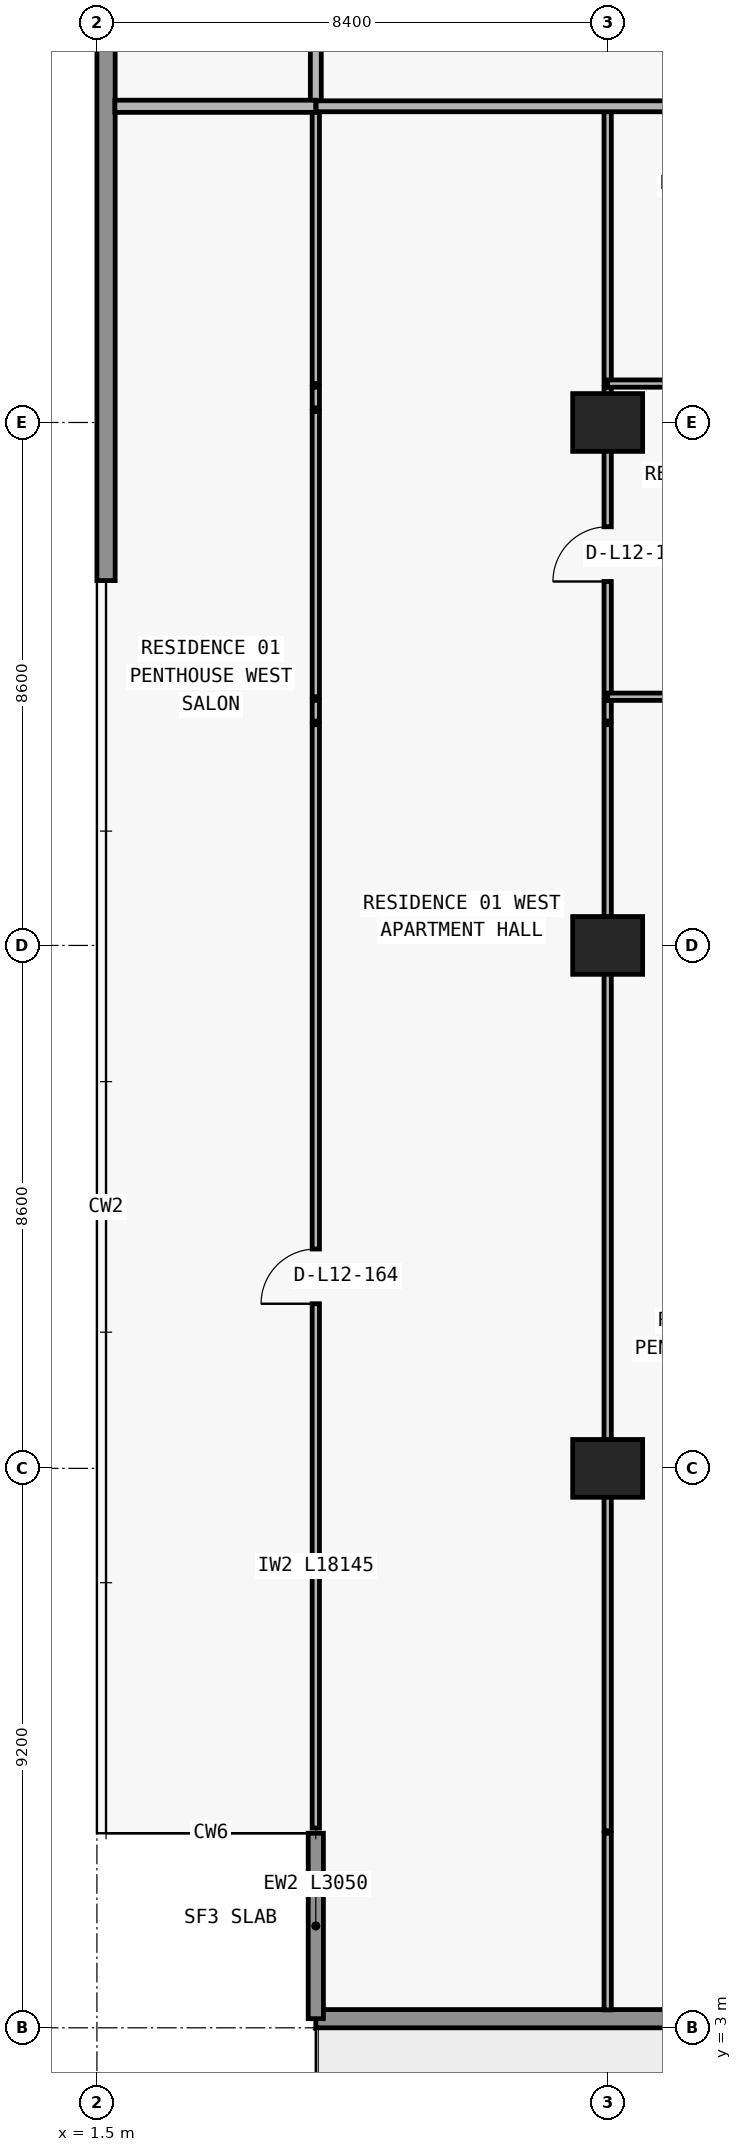
"""IFC4 building model, lengths in metres.
Left out: names, types, materials, properties, quantities, classifications, styles, units other than length and angle.
Written with IfcOpenShell. Run it as: python <this file> out.ifc"""

import sys

from ifc_helpers import new_model, si_unit, direction, frame, frame_2d, origin, origin_2d, place, context, subcontext, project, spatial, rectangle, extrude, element, fill, save


model = new_model("IFC4")
c1 = context("Model", 3, precision=1e-05, world=origin(), true_north=direction((0.0, 1.0)))
c2 = subcontext(c1, "Body", "Model", "MODEL_VIEW")
j1 = project(units=[si_unit("LENGTHUNIT", "METRE"), si_unit("PLANEANGLEUNIT", "RADIAN")], contexts=[c1])
p1 = place(None, origin())
s1 = spatial("IfcSite", under=j1, at=p1, CompositionType="ELEMENT")
p2 = place(p1, origin())
s2 = spatial("IfcBuilding", under=s1, at=p2, CompositionType="ELEMENT")
p3 = place(p2, frame((0.0, 0.0, 49.8)))
s3 = spatial("IfcBuildingStorey", under=s2, at=p3, CompositionType="ELEMENT", Elevation=49.8)
for number, where, z_axis, x_axis in (
    (1, (9.9, 12.2, 0.0), (0.0, 0.0, 1.0), (1.0, 0.0, 0.0)),
    (2, (9.9, 20.8, 0.0), (0.0, 0.0, 1.0), (1.0, 0.0, 0.0)),
    (3, (9.9, 29.4, 0.0), (0.0, 0.0, 1.0), (1.0, 0.0, 0.0)),
):
    element("IfcColumn", number, at=place(p3, frame(where, z_axis=z_axis, x_axis=x_axis)), inside=s3, PredefinedType="COLUMN", context=c2, shape_type="SweptSolid", body=[
        extrude(rectangle(XDim=1.15, YDim=0.95, at=origin_2d()), origin(), (0.0, 0.0, 1.0), 3.05),
    ])
p4 = place(p3, frame((72.7, 3.15, 0.0), z_axis=(0.0, 0.0, 1.0), x_axis=(-1.0, 0.0, 0.0)))
e4 = element("IfcWall", 4, at=p4, inside=s3, PredefinedType="STANDARD", context=c2, shape_type="SweptSolid", body=[
    extrude(rectangle(XDim=67.6, YDim=0.3, at=frame_2d((33.8, 0.0))), origin(), (0.0, 0.0, 1.0), 3.05),
])
p5 = place(p4, frame((59.826, 0.0, 0.0)))
e5 = element("IfcOpeningElement", 5, at=p5, cuts=e4, PredefinedType="OPENING", context=c2, shape_type="SweptSolid", body=[
    extrude(rectangle(XDim=2.0, YDim=2.3, at=frame_2d((1.0, 1.15))), frame((0.0, 0.16, 0.0), z_axis=(0.0, -1.0, 0.0), x_axis=(1.0, 0.0, 0.0)), (0.0, 0.0, 1.0), 0.32),
])
p6 = place(p4, frame((55.526, 0.0, 0.85)))
e6 = element("IfcOpeningElement", 6, at=p6, cuts=e4, PredefinedType="OPENING", context=c2, shape_type="SweptSolid", body=[
    extrude(rectangle(XDim=2.2, YDim=1.55, at=frame_2d((1.1, 0.775))), frame((0.0, 0.16, 0.0), z_axis=(0.0, -1.0, 0.0), x_axis=(1.0, 0.0, 0.0)), (0.0, 0.0, 1.0), 0.32),
])
p7 = place(p4, frame((51.09, 0.0, 0.0)))
e7 = element("IfcOpeningElement", 7, at=p7, cuts=e4, PredefinedType="OPENING", context=c2, shape_type="SweptSolid", body=[
    extrude(rectangle(XDim=2.0, YDim=2.3, at=frame_2d((1.0, 1.15))), frame((0.0, 0.16, 0.0), z_axis=(0.0, -1.0, 0.0), x_axis=(1.0, 0.0, 0.0)), (0.0, 0.0, 1.0), 0.32),
])
p8 = place(p4, frame((46.99, 0.0, 0.85)))
e8 = element("IfcOpeningElement", 8, at=p8, cuts=e4, PredefinedType="OPENING", context=c2, shape_type="SweptSolid", body=[
    extrude(rectangle(XDim=1.8, YDim=1.55, at=frame_2d((0.9, 0.775))), frame((0.0, 0.16, 0.0), z_axis=(0.0, -1.0, 0.0), x_axis=(1.0, 0.0, 0.0)), (0.0, 0.0, 1.0), 0.32),
])
p9 = place(p4, frame((43.09, 0.0, 0.0)))
e9 = element("IfcOpeningElement", 9, at=p9, cuts=e4, PredefinedType="OPENING", context=c2, shape_type="SweptSolid", body=[
    extrude(rectangle(XDim=2.0, YDim=2.3, at=frame_2d((1.0, 1.15))), frame((0.0, 0.16, 0.0), z_axis=(0.0, -1.0, 0.0), x_axis=(1.0, 0.0, 0.0)), (0.0, 0.0, 1.0), 0.32),
])
p10 = place(p4, frame((38.41, 0.0, 0.65)))
e10 = element("IfcOpeningElement", 10, at=p10, cuts=e4, PredefinedType="OPENING", context=c2, shape_type="SweptSolid", body=[
    extrude(rectangle(XDim=2.6, YDim=1.85, at=frame_2d((1.3, 0.925))), frame((0.0, 0.16, 0.0), z_axis=(0.0, -1.0, 0.0), x_axis=(1.0, 0.0, 0.0)), (0.0, 0.0, 1.0), 0.32),
])
p11 = place(p4, frame((32.7, 0.0, 0.85)))
e11 = element("IfcOpeningElement", 11, at=p11, cuts=e4, PredefinedType="OPENING", context=c2, shape_type="SweptSolid", body=[
    extrude(rectangle(XDim=2.2, YDim=1.55, at=frame_2d((1.1, 0.775))), frame((0.0, 0.16, 0.0), z_axis=(0.0, -1.0, 0.0), x_axis=(1.0, 0.0, 0.0)), (0.0, 0.0, 1.0), 0.32),
])
p12 = place(p4, frame((24.7, 0.0, 0.85)))
e12 = element("IfcOpeningElement", 12, at=p12, cuts=e4, PredefinedType="OPENING", context=c2, shape_type="SweptSolid", body=[
    extrude(rectangle(XDim=2.2, YDim=1.55, at=frame_2d((1.1, 0.775))), frame((0.0, 0.16, 0.0), z_axis=(0.0, -1.0, 0.0), x_axis=(1.0, 0.0, 0.0)), (0.0, 0.0, 1.0), 0.32),
])
p13 = place(p4, frame((18.29, 0.0, 0.0)))
e13 = element("IfcOpeningElement", 13, at=p13, cuts=e4, PredefinedType="OPENING", context=c2, shape_type="SweptSolid", body=[
    extrude(rectangle(XDim=2.0, YDim=2.3, at=frame_2d((1.0, 1.15))), frame((0.0, 0.16, 0.0), z_axis=(0.0, -1.0, 0.0), x_axis=(1.0, 0.0, 0.0)), (0.0, 0.0, 1.0), 0.32),
])
p14 = place(p4, frame((14.19, 0.0, 0.85)))
e14 = element("IfcOpeningElement", 14, at=p14, cuts=e4, PredefinedType="OPENING", context=c2, shape_type="SweptSolid", body=[
    extrude(rectangle(XDim=1.8, YDim=1.55, at=frame_2d((0.9, 0.775))), frame((0.0, 0.16, 0.0), z_axis=(0.0, -1.0, 0.0), x_axis=(1.0, 0.0, 0.0)), (0.0, 0.0, 1.0), 0.32),
])
p15 = place(p4, frame((10.226, 0.0, 0.0)))
e15 = element("IfcOpeningElement", 15, at=p15, cuts=e4, PredefinedType="OPENING", context=c2, shape_type="SweptSolid", body=[
    extrude(rectangle(XDim=2.0, YDim=2.3, at=frame_2d((1.0, 1.15))), frame((0.0, 0.16, 0.0), z_axis=(0.0, -1.0, 0.0), x_axis=(1.0, 0.0, 0.0)), (0.0, 0.0, 1.0), 0.32),
])
p16 = place(p4, frame((5.926, 0.0, 0.85)))
e16 = element("IfcOpeningElement", 16, at=p16, cuts=e4, PredefinedType="OPENING", context=c2, shape_type="SweptSolid", body=[
    extrude(rectangle(XDim=2.2, YDim=1.55, at=frame_2d((1.1, 0.775))), frame((0.0, 0.16, 0.0), z_axis=(0.0, -1.0, 0.0), x_axis=(1.0, 0.0, 0.0)), (0.0, 0.0, 1.0), 0.32),
])
p17 = place(p3, frame((5.1, 6.2, 0.0), z_axis=(0.0, 0.0, 1.0), x_axis=(0.0, -1.0, 0.0)))
e17 = element("IfcWall", 17, at=p17, inside=s3, PredefinedType="ELEMENTEDWALL", context=c2, shape_type="SweptSolid", body=[
    extrude(rectangle(XDim=3.05, YDim=0.25, at=frame_2d((1.525, 0.0))), origin(), (0.0, 0.0, 1.0), 3.05),
])
p18 = place(p3, frame((1.65, 26.8, 0.0), z_axis=(0.0, 0.0, 1.0), x_axis=(0.0, 1.0, 0.0)))
e18 = element("IfcWall", 18, at=p18, inside=s3, PredefinedType="STANDARD", context=c2, shape_type="SweptSolid", body=[
    extrude(rectangle(XDim=20.6, YDim=0.3, at=frame_2d((10.3, 0.0))), origin(), (0.0, 0.0, 1.0), 3.05),
])
p19 = place(p3, frame((5.1, 6.285, 0.0), z_axis=(0.0, 0.0, 1.0), x_axis=(0.0, 1.0, 0.0)))
e19 = element("IfcWall", 19, at=p19, inside=s3, PredefinedType="PARTITIONING", context=c2, shape_type="SweptSolid", body=[
    extrude(rectangle(XDim=18.145, YDim=0.12, at=frame_2d((9.073, 0.0))), origin(), (0.0, 0.0, 1.0), 3.05),
])
p20 = place(p19, frame((8.623, 0.0, 0.0)))
e20 = element("IfcOpeningElement", 20, at=p20, cuts=e19, PredefinedType="OPENING", context=c2, shape_type="SweptSolid", body=[
    extrude(rectangle(XDim=0.9, YDim=2.15, at=frame_2d((0.45, 1.075))), frame((0.0, 0.07, 0.0), z_axis=(0.0, -1.0, 0.0), x_axis=(1.0, 0.0, 0.0)), (0.0, 0.0, 1.0), 0.14),
])
p21 = place(p3, frame((5.1, 24.49, 0.0), z_axis=(0.0, 0.0, 1.0), x_axis=(0.0, 1.0, 0.0)))
e21 = element("IfcWall", 21, at=p21, inside=s3, PredefinedType="PARTITIONING", context=c2, shape_type="SweptSolid", body=[
    extrude(rectangle(XDim=0.34, YDim=0.12, at=frame_2d((0.17, 0.0))), origin(), (0.0, 0.0, 1.0), 3.05),
])
p22 = place(p3, frame((5.1, 24.89, 0.0), z_axis=(0.0, 0.0, 1.0), x_axis=(0.0, 1.0, 0.0)))
e22 = element("IfcWall", 22, at=p22, inside=s3, PredefinedType="PARTITIONING", context=c2, shape_type="SweptSolid", body=[
    extrude(rectangle(XDim=4.69, YDim=0.12, at=frame_2d((2.345, 0.0))), origin(), (0.0, 0.0, 1.0), 3.05),
])
p23 = place(p3, frame((5.1, 29.64, 0.0), z_axis=(0.0, 0.0, 1.0), x_axis=(0.0, 1.0, 0.0)))
e23 = element("IfcWall", 23, at=p23, inside=s3, PredefinedType="PARTITIONING", context=c2, shape_type="SweptSolid", body=[
    extrude(rectangle(XDim=0.34, YDim=0.12, at=frame_2d((0.17, 0.0))), origin(), (0.0, 0.0, 1.0), 3.05),
])
p24 = place(p3, frame((5.1, 30.04, 0.0), z_axis=(0.0, 0.0, 1.0), x_axis=(0.0, 1.0, 0.0)))
e24 = element("IfcWall", 24, at=p24, inside=s3, PredefinedType="PARTITIONING", context=c2, shape_type="SweptSolid", body=[
    extrude(rectangle(XDim=4.56, YDim=0.12, at=frame_2d((2.28, 0.0))), origin(), (0.0, 0.0, 1.0), 3.05),
])
p25 = place(p3, frame((5.1, 34.605, 0.0), z_axis=(0.0, 0.0, 1.0), x_axis=(0.0, 1.0, 0.0)))
e25 = element("IfcWall", 25, at=p25, inside=s3, PredefinedType="PARTITIONING", context=c2, shape_type="SweptSolid", body=[
    extrude(rectangle(XDim=2.295, YDim=0.18, at=frame_2d((1.147, 0.0))), origin(), (0.0, 0.0, 1.0), 3.05),
])
p26 = place(p3, frame((9.9, 3.295, 0.0), z_axis=(0.0, 0.0, 1.0), x_axis=(0.0, 1.0, 0.0)))
e26 = element("IfcWall", 26, at=p26, inside=s3, PredefinedType="PARTITIONING", context=c2, shape_type="SweptSolid", body=[
    extrude(rectangle(XDim=2.905, YDim=0.12, at=frame_2d((1.453, 0.0))), origin(), (0.0, 0.0, 1.0), 3.05),
])
p27 = place(p3, frame((9.9, 6.24, 0.0), z_axis=(0.0, 0.0, 1.0), x_axis=(0.0, 1.0, 0.0)))
e27 = element("IfcWall", 27, at=p27, inside=s3, PredefinedType="PARTITIONING", context=c2, shape_type="SweptSolid", body=[
    extrude(rectangle(XDim=18.19, YDim=0.12, at=frame_2d((9.095, 0.0))), origin(), (0.0, 0.0, 1.0), 2.11),
])
p28 = place(p3, frame((9.9, 24.49, 0.0), z_axis=(0.0, 0.0, 1.0), x_axis=(0.0, 1.0, 0.0)))
e28 = element("IfcWall", 28, at=p28, inside=s3, PredefinedType="PARTITIONING", context=c2, shape_type="SweptSolid", body=[
    extrude(rectangle(XDim=0.34, YDim=0.12, at=frame_2d((0.17, 0.0))), origin(), (0.0, 0.0, 1.0), 2.11),
])
p29 = place(p3, frame((9.9, 24.89, 0.0), z_axis=(0.0, 0.0, 1.0), x_axis=(0.0, 1.0, 0.0)))
e29 = element("IfcWall", 29, at=p29, inside=s3, PredefinedType="PARTITIONING", context=c2, shape_type="SweptSolid", body=[
    extrude(rectangle(XDim=4.69, YDim=0.12, at=frame_2d((2.345, 0.0))), origin(), (0.0, 0.0, 1.0), 2.11),
])
p30 = place(p29, frame((1.895, 0.0, 0.0)))
e30 = element("IfcOpeningElement", 30, at=p30, cuts=e29, PredefinedType="OPENING", context=c2, shape_type="SweptSolid", body=[
    extrude(rectangle(XDim=0.9, YDim=2.06, at=frame_2d((0.45, 1.03))), frame((0.0, 0.07, 0.0), z_axis=(0.0, -1.0, 0.0), x_axis=(1.0, 0.0, 0.0)), (0.0, 0.0, 1.0), 0.14),
])
p31 = place(p3, frame((9.9, 29.64, 0.0), z_axis=(0.0, 0.0, 1.0), x_axis=(0.0, 1.0, 0.0)))
e31 = element("IfcWall", 31, at=p31, inside=s3, PredefinedType="PARTITIONING", context=c2, shape_type="SweptSolid", body=[
    extrude(rectangle(XDim=0.34, YDim=0.12, at=frame_2d((0.17, 0.0))), origin(), (0.0, 0.0, 1.0), 2.11),
])
p32 = place(p3, frame((9.9, 30.04, 0.0), z_axis=(0.0, 0.0, 1.0), x_axis=(0.0, 1.0, 0.0)))
e32 = element("IfcWall", 32, at=p32, inside=s3, PredefinedType="PARTITIONING", context=c2, shape_type="SweptSolid", body=[
    extrude(rectangle(XDim=4.56, YDim=0.12, at=frame_2d((2.28, 0.0))), origin(), (0.0, 0.0, 1.0), 2.11),
])
p33 = place(p3, frame((9.9, 24.89, 0.0), z_axis=(0.0, 0.0, 1.0), x_axis=(1.0, 0.0, 0.0)))
e33 = element("IfcWall", 33, at=p33, inside=s3, PredefinedType="PARTITIONING", context=c2, shape_type="SweptSolid", body=[
    extrude(rectangle(XDim=8.4, YDim=0.12, at=frame_2d((4.2, 0.0))), origin(), (0.0, 0.0, 1.0), 3.05),
])
p34 = place(p33, frame((1.524, 0.0, 0.0)))
e34 = element("IfcOpeningElement", 34, at=p34, cuts=e33, PredefinedType="OPENING", context=c2, shape_type="SweptSolid", body=[
    extrude(rectangle(XDim=0.9, YDim=2.15, at=frame_2d((0.45, 1.075))), frame((0.0, 0.07, 0.0), z_axis=(0.0, -1.0, 0.0), x_axis=(1.0, 0.0, 0.0)), (0.0, 0.0, 1.0), 0.14),
])
p35 = place(p33, frame((5.893, 0.0, 0.0)))
e35 = element("IfcOpeningElement", 35, at=p35, cuts=e33, PredefinedType="OPENING", context=c2, shape_type="SweptSolid", body=[
    extrude(rectangle(XDim=0.9, YDim=2.15, at=frame_2d((0.45, 1.075))), frame((0.0, 0.07, 0.0), z_axis=(0.0, -1.0, 0.0), x_axis=(1.0, 0.0, 0.0)), (0.0, 0.0, 1.0), 0.14),
])
p36 = place(p3, frame((9.9, 30.04, 0.0), z_axis=(0.0, 0.0, 1.0), x_axis=(1.0, 0.0, 0.0)))
e36 = element("IfcWall", 36, at=p36, inside=s3, PredefinedType="PARTITIONING", context=c2, shape_type="SweptSolid", body=[
    extrude(rectangle(XDim=8.4, YDim=0.12, at=frame_2d((4.2, 0.0))), origin(), (0.0, 0.0, 1.0), 3.05),
])
p37 = place(p36, frame((1.693, 0.0, 0.0)))
e37 = element("IfcOpeningElement", 37, at=p37, cuts=e36, PredefinedType="OPENING", context=c2, shape_type="SweptSolid", body=[
    extrude(rectangle(XDim=0.9, YDim=2.15, at=frame_2d((0.45, 1.075))), frame((0.0, 0.07, 0.0), z_axis=(0.0, -1.0, 0.0), x_axis=(1.0, 0.0, 0.0)), (0.0, 0.0, 1.0), 0.14),
])
p38 = place(p3, frame((1.795, 34.6, 0.0), z_axis=(0.0, 0.0, 1.0), x_axis=(1.0, 0.0, 0.0)))
e38 = element("IfcWall", 38, at=p38, inside=s3, PredefinedType="PARTITIONING", context=c2, shape_type="SweptSolid", body=[
    extrude(rectangle(XDim=3.305, YDim=0.2, at=frame_2d((1.653, 0.0))), origin(), (0.0, 0.0, 1.0), 3.05),
])
p39 = place(p3, frame((5.105, 34.6, 0.0), z_axis=(0.0, 0.0, 1.0), x_axis=(1.0, 0.0, 0.0)))
e39 = element("IfcWall", 39, at=p39, inside=s3, PredefinedType="PARTITIONING", context=c2, shape_type="SweptSolid", body=[
    extrude(rectangle(XDim=67.595, YDim=0.18, at=frame_2d((33.797, 0.0))), origin(), (0.0, 0.0, 1.0), 3.05),
])
p40 = place(p39, frame((7.365, 0.0, 0.0)))
e40 = element("IfcOpeningElement", 40, at=p40, cuts=e39, PredefinedType="OPENING", context=c2, shape_type="SweptSolid", body=[
    extrude(rectangle(XDim=1.0, YDim=2.2, at=frame_2d((0.5, 1.1))), frame((0.0, 0.1, 0.0), z_axis=(0.0, -1.0, 0.0), x_axis=(1.0, 0.0, 0.0)), (0.0, 0.0, 1.0), 0.2),
])
p41 = place(p39, frame((15.927, 0.0, 0.0)))
e41 = element("IfcOpeningElement", 41, at=p41, cuts=e39, PredefinedType="OPENING", context=c2, shape_type="SweptSolid", body=[
    extrude(rectangle(XDim=1.0, YDim=2.2, at=frame_2d((0.5, 1.1))), frame((0.0, 0.1, 0.0), z_axis=(0.0, -1.0, 0.0), x_axis=(1.0, 0.0, 0.0)), (0.0, 0.0, 1.0), 0.2),
])
p42 = place(p39, frame((24.407, 0.0, 0.0)))
e42 = element("IfcOpeningElement", 42, at=p42, cuts=e39, PredefinedType="OPENING", context=c2, shape_type="SweptSolid", body=[
    extrude(rectangle(XDim=1.0, YDim=2.2, at=frame_2d((0.5, 1.1))), frame((0.0, 0.1, 0.0), z_axis=(0.0, -1.0, 0.0), x_axis=(1.0, 0.0, 0.0)), (0.0, 0.0, 1.0), 0.2),
])
p43 = place(p39, frame((48.739, 0.0, 0.0)))
e43 = element("IfcOpeningElement", 43, at=p43, cuts=e39, PredefinedType="OPENING", context=c2, shape_type="SweptSolid", body=[
    extrude(rectangle(XDim=1.0, YDim=2.2, at=frame_2d((0.5, 1.1))), frame((0.0, 0.1, 0.0), z_axis=(0.0, -1.0, 0.0), x_axis=(1.0, 0.0, 0.0)), (0.0, 0.0, 1.0), 0.2),
])
p44 = place(p39, frame((56.98, 0.0, 0.0)))
e44 = element("IfcOpeningElement", 44, at=p44, cuts=e39, PredefinedType="OPENING", context=c2, shape_type="SweptSolid", body=[
    extrude(rectangle(XDim=1.0, YDim=2.2, at=frame_2d((0.5, 1.1))), frame((0.0, 0.1, 0.0), z_axis=(0.0, -1.0, 0.0), x_axis=(1.0, 0.0, 0.0)), (0.0, 0.0, 1.0), 0.2),
])
p45 = place(p30, origin())
e45 = element("IfcDoor", 45, at=p45, inside=s3, OperationType="SINGLE_SWING_LEFT", PredefinedType="DOOR", context=c2, shape_type="SweptSolid", body=[
    extrude(rectangle(XDim=0.9, YDim=2.06, at=frame_2d((0.45, 1.03))), frame((0.0, 0.025, 0.0), z_axis=(0.0, -1.0, 0.0), x_axis=(1.0, 0.0, 0.0)), (0.0, 0.0, 1.0), 0.05),
])
fill(e30, e45)
p46 = place(p20, origin())
e46 = element("IfcDoor", 46, at=p46, inside=s3, OperationType="SINGLE_SWING_LEFT", PredefinedType="DOOR", context=c2, shape_type="SweptSolid", body=[
    extrude(rectangle(XDim=0.9, YDim=2.15, at=frame_2d((0.45, 1.075))), frame((0.0, 0.025, 0.0), z_axis=(0.0, -1.0, 0.0), x_axis=(1.0, 0.0, 0.0)), (0.0, 0.0, 1.0), 0.05),
])
fill(e20, e46)
save(model, sys.argv[1])
